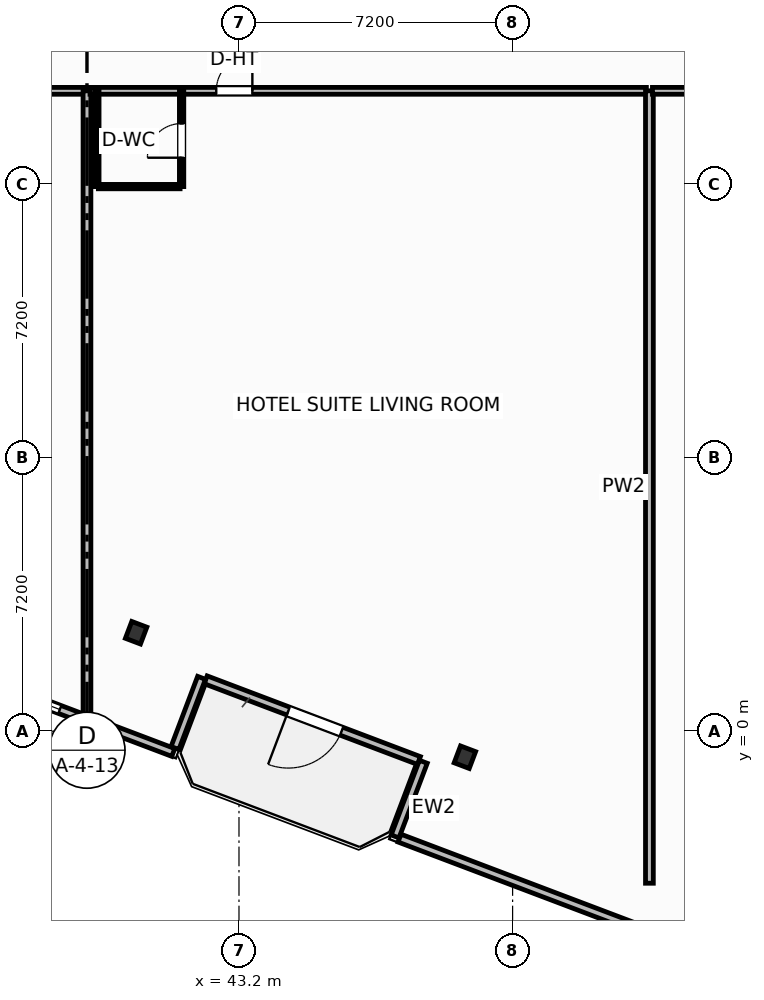
"""IFC4 building model, lengths in metres.
Left out: names, types, materials, properties, quantities, classifications, styles, units other than length and angle.
Written with IfcOpenShell. Run it as: python <this file> out.ifc"""

import sys

from ifc_helpers import new_model, si_unit, direction, frame, frame_2d, origin, origin_2d, place, context, subcontext, project, spatial, rectangle, i_section, extrude, element, fill, save


model = new_model("IFC4")
c1 = context("Model", 3, precision=1e-05, world=origin(), true_north=direction((0.0, 1.0)))
c2 = subcontext(c1, "Body", "Model", "MODEL_VIEW")
j1 = project(units=[si_unit("LENGTHUNIT", "METRE"), si_unit("PLANEANGLEUNIT", "RADIAN")], contexts=[c1])
p1 = place(None, origin())
s1 = spatial("IfcSite", under=j1, at=p1, CompositionType="ELEMENT")
p2 = place(p1, origin())
s2 = spatial("IfcBuilding", under=s1, at=p2, CompositionType="ELEMENT")
p3 = place(p2, frame((0.0, 0.0, 102.1)))
s3 = spatial("IfcBuildingStorey", under=s2, at=p3, CompositionType="ELEMENT", Elevation=102.1)
for number, where, z_axis, x_axis in (
    (1, (40.493, 2.591, 0.0), (0.0, 0.0, 1.0), (0.935, -0.354, 0.0)),
    (2, (49.144, -0.684, 0.0), (0.0, 0.0, 1.0), (0.935, -0.354, 0.0)),
):
    element("IfcColumn", number, at=place(p3, frame(where, z_axis=z_axis, x_axis=x_axis)), inside=s3, PredefinedType="COLUMN", context=c2, shape_type="SweptSolid", body=[
        extrude(i_section(OverallWidth=0.424, OverallDepth=0.474, WebThickness=0.048, FlangeThickness=0.077, FilletRadius=0.025, at=origin_2d()), origin(), (0.0, 0.0, 1.0), 3.7),
    ])
p4 = place(p3, frame((47.935, -0.771, 0.0), z_axis=(0.0, 0.0, 1.0), x_axis=(-0.935227640088, 0.354046976001, 0.0)))
e3 = element("IfcWall", 3, at=p4, inside=s3, PredefinedType="SOLIDWALL", context=c2, shape_type="SweptSolid", body=[
    extrude(rectangle(XDim=6.0, YDim=0.22, at=frame_2d((3.0, 0.0))), origin(), (0.0, 0.0, 1.0), 2.73),
])
p5 = place(p4, frame((2.176, 0.0, 0.0)))
e4 = element("IfcOpeningElement", 4, at=p5, cuts=e3, PredefinedType="OPENING", context=c2, shape_type="SweptSolid", body=[
    extrude(rectangle(XDim=1.5, YDim=2.25, at=frame_2d((0.75, 1.125))), frame((0.0, 0.12, 0.0), z_axis=(0.0, -1.0, 0.0), x_axis=(1.0, 0.0, 0.0)), (0.0, 0.0, 1.0), 0.24),
])
p6 = place(p3, frame((33.957, 2.286, 0.0), z_axis=(0.0, 0.0, 1.0), x_axis=(0.935220736163, -0.354065212427, 0.0)))
e5 = element("IfcWall", 5, at=p6, inside=s3, PredefinedType="SOLIDWALL", context=c2, shape_type="SweptSolid", body=[
    extrude(rectangle(XDim=8.035, YDim=0.22, at=frame_2d((4.018, 0.0))), origin(), (0.0, 0.0, 1.0), 2.73),
])
p7 = place(p6, frame((3.192, 0.0, 0.8)))
e6 = element("IfcOpeningElement", 6, at=p7, cuts=e5, PredefinedType="OPENING", context=c2, shape_type="SweptSolid", body=[
    extrude(rectangle(XDim=1.65, YDim=1.65, at=frame_2d((0.825, 0.825))), frame((0.0, 0.12, 0.0), z_axis=(0.0, -1.0, 0.0), x_axis=(1.0, 0.0, 0.0)), (0.0, 0.0, 1.0), 0.24),
])
p8 = place(p3, frame((41.516, -0.442, 0.0), z_axis=(0.0, 0.0, 1.0), x_axis=(0.354061611705, 0.935222099352, 0.0)))
e7 = element("IfcWall", 7, at=p8, inside=s3, PredefinedType="SOLIDWALL", context=c2, shape_type="SweptSolid", body=[
    extrude(rectangle(XDim=1.975, YDim=0.22, at=frame_2d((0.987, 0.0))), origin(), (0.0, 0.0, 1.0), 2.73),
])
p9 = place(p3, frame((48.051, -0.805, 0.0), z_axis=(0.0, 0.0, 1.0), x_axis=(-0.353988291547, -0.935249854022, 0.0)))
e8 = element("IfcWall", 8, at=p9, inside=s3, PredefinedType="SOLIDWALL", context=c2, shape_type="SweptSolid", body=[
    extrude(rectangle(XDim=2.1, YDim=0.22, at=frame_2d((1.05, 0.0))), origin(), (0.0, 0.0, 1.0), 2.73),
])
p10 = place(p3, frame((47.424, -2.813, 0.0), z_axis=(0.0, 0.0, 1.0), x_axis=(0.935225962032, -0.354051408614, 0.0)))
e9 = element("IfcWall", 9, at=p10, inside=s3, PredefinedType="SOLIDWALL", context=c2, shape_type="SweptSolid", body=[
    extrude(rectangle(XDim=14.347, YDim=0.22, at=frame_2d((7.173, 0.0))), origin(), (0.0, 0.0, 1.0), 2.73),
])
p11 = place(p10, frame((6.348, 0.0, 0.8)))
e10 = element("IfcOpeningElement", 10, at=p11, cuts=e9, PredefinedType="OPENING", context=c2, shape_type="SweptSolid", body=[
    extrude(rectangle(XDim=1.65, YDim=1.65, at=frame_2d((0.825, 0.825))), frame((0.0, 0.12, 0.0), z_axis=(0.0, -1.0, 0.0), x_axis=(1.0, 0.0, 0.0)), (0.0, 0.0, 1.0), 0.24),
])
p12 = place(p3, frame((24.08, 16.85, 0.0), z_axis=(0.0, 0.0, 1.0), x_axis=(1.0, 0.0, 0.0)))
e11 = element("IfcWall", 11, at=p12, inside=s3, PredefinedType="PARTITIONING", context=c2, shape_type="SweptSolid", body=[
    extrude(rectangle(XDim=15.04, YDim=0.18, at=frame_2d((7.52, 0.0))), origin(), (0.0, 0.0, 1.0), 3.45),
])
p13 = place(p12, frame((7.045, 0.0, 0.0)))
e12 = element("IfcOpeningElement", 12, at=p13, cuts=e11, PredefinedType="OPENING", context=c2, shape_type="SweptSolid", body=[
    extrude(rectangle(XDim=0.95, YDim=2.05, at=frame_2d((0.475, 1.025))), frame((0.0, 0.1, 0.0), z_axis=(0.0, -1.0, 0.0), x_axis=(1.0, 0.0, 0.0)), (0.0, 0.0, 1.0), 0.2),
])
p14 = place(p3, frame((39.2, 0.322, 0.0), z_axis=(0.0, 0.0, 1.0), x_axis=(0.0, 1.0, 0.0)))
e13 = element("IfcWall", 13, at=p14, inside=s3, PredefinedType="PARTITIONING", context=c2, shape_type="SweptSolid", body=[
    extrude(rectangle(XDim=16.528, YDim=0.205, at=frame_2d((8.264, 0.0))), origin(), (0.0, 0.0, 1.0), 3.45),
])
p15 = place(p3, frame((39.28, 16.85, 0.0), z_axis=(0.0, 0.0, 1.0), x_axis=(1.0, 0.0, 0.0)))
e14 = element("IfcWall", 14, at=p15, inside=s3, PredefinedType="PARTITIONING", context=c2, shape_type="SweptSolid", body=[
    extrude(rectangle(XDim=14.64, YDim=0.18, at=frame_2d((7.32, 0.0))), origin(), (0.0, 0.0, 1.0), 3.45),
])
p16 = place(p15, frame((3.322, 0.0, 0.0)))
e15 = element("IfcOpeningElement", 15, at=p16, cuts=e14, PredefinedType="OPENING", context=c2, shape_type="SweptSolid", body=[
    extrude(rectangle(XDim=0.95, YDim=2.15, at=frame_2d((0.475, 1.075))), frame((0.0, 0.1, 0.0), z_axis=(0.0, -1.0, 0.0), x_axis=(1.0, 0.0, 0.0)), (0.0, 0.0, 1.0), 0.2),
])
p17 = place(p3, frame((39.5, 14.33, 0.0), z_axis=(0.0, 0.0, 1.0), x_axis=(1.0, 0.0, 0.0)))
e16 = element("IfcWall", 16, at=p17, inside=s3, PredefinedType="PARTITIONING", context=c2, shape_type="SweptSolid", body=[
    extrude(rectangle(XDim=2.15, YDim=0.115, at=frame_2d((1.075, 0.0))), origin(), (0.0, 0.0, 1.0), 3.45),
])
p18 = place(p3, frame((41.69, 14.33, 0.0), z_axis=(0.0, 0.0, 1.0), x_axis=(0.0, 1.0, 0.0)))
e17 = element("IfcWall", 17, at=p18, inside=s3, PredefinedType="PARTITIONING", context=c2, shape_type="SweptSolid", body=[
    extrude(rectangle(XDim=2.52, YDim=0.115, at=frame_2d((1.26, 0.0))), origin(), (0.0, 0.0, 1.0), 3.45),
])
p19 = place(p18, frame((0.76, 0.0, 0.0)))
e18 = element("IfcOpeningElement", 18, at=p19, cuts=e17, PredefinedType="OPENING", context=c2, shape_type="SweptSolid", body=[
    extrude(rectangle(XDim=0.9, YDim=2.05, at=frame_2d((0.45, 1.025))), frame((0.0, 0.067, 0.0), z_axis=(0.0, -1.0, 0.0), x_axis=(1.0, 0.0, 0.0)), (0.0, 0.0, 1.0), 0.135),
])
p20 = place(p3, frame((39.46, 14.33, 0.0), z_axis=(0.0, 0.0, 1.0), x_axis=(0.0, 1.0, 0.0)))
e19 = element("IfcWall", 19, at=p20, inside=s3, PredefinedType="PARTITIONING", context=c2, shape_type="SweptSolid", body=[
    extrude(rectangle(XDim=2.52, YDim=0.115, at=frame_2d((1.26, 0.0))), origin(), (0.0, 0.0, 1.0), 3.45),
])
p21 = place(p3, frame((54.0, -4.0, 0.0), z_axis=(0.0, 0.0, 1.0), x_axis=(0.0, 1.0, 0.0)))
e20 = element("IfcWall", 20, at=p21, inside=s3, PredefinedType="PARTITIONING", context=c2, shape_type="SweptSolid", body=[
    extrude(rectangle(XDim=20.85, YDim=0.205, at=frame_2d((10.425, 0.0))), origin(), (0.0, 0.0, 1.0), 3.45),
])
p22 = place(p3, frame((54.08, 16.85, 0.0), z_axis=(0.0, 0.0, 1.0), x_axis=(1.0, 0.0, 0.0)))
e21 = element("IfcWall", 21, at=p22, inside=s3, PredefinedType="PARTITIONING", context=c2, shape_type="SweptSolid", body=[
    extrude(rectangle(XDim=21.722, YDim=0.18, at=frame_2d((10.861, 0.0))), origin(), (0.0, 0.0, 1.0), 2.58),
])
p23 = place(p22, frame((0.934, 0.0, 0.0)))
e22 = element("IfcOpeningElement", 22, at=p23, cuts=e21, PredefinedType="OPENING", context=c2, shape_type="SweptSolid", body=[
    extrude(rectangle(XDim=0.95, YDim=2.15, at=frame_2d((0.475, 1.075))), frame((0.0, 0.1, 0.0), z_axis=(0.0, -1.0, 0.0), x_axis=(1.0, 0.0, 0.0)), (0.0, 0.0, 1.0), 0.2),
])
p24 = place(p5, origin())
e23 = element("IfcDoor", 23, at=p24, inside=s3, OperationType="SINGLE_SWING_RIGHT", PredefinedType="DOOR", context=c2, shape_type="SweptSolid", body=[
    extrude(rectangle(XDim=1.5, YDim=2.25, at=frame_2d((0.75, 1.125))), frame((0.0, 0.025, 0.0), z_axis=(0.0, -1.0, 0.0), x_axis=(1.0, 0.0, 0.0)), (0.0, 0.0, 1.0), 0.05),
])
fill(e4, e23)
p25 = place(p7, origin())
e24 = element("IfcWindow", 24, at=p25, inside=s3, PartitioningType="SINGLE_PANEL", PredefinedType="WINDOW", context=c2, shape_type="SweptSolid", body=[
    extrude(rectangle(XDim=1.65, YDim=1.65, at=frame_2d((0.825, 0.825))), frame((0.0, 0.03, 0.0), z_axis=(0.0, -1.0, 0.0), x_axis=(1.0, 0.0, 0.0)), (0.0, 0.0, 1.0), 0.06),
])
fill(e6, e24)
p26 = place(p16, origin())
e25 = element("IfcDoor", 25, at=p26, inside=s3, OperationType="SINGLE_SWING_RIGHT", PredefinedType="DOOR", context=c2, shape_type="SweptSolid", body=[
    extrude(rectangle(XDim=0.95, YDim=2.15, at=frame_2d((0.475, 1.075))), frame((0.0, 0.025, 0.0), z_axis=(0.0, -1.0, 0.0), x_axis=(1.0, 0.0, 0.0)), (0.0, 0.0, 1.0), 0.05),
])
fill(e15, e25)
p27 = place(p19, origin())
e26 = element("IfcDoor", 26, at=p27, inside=s3, OperationType="SINGLE_SWING_LEFT", PredefinedType="DOOR", context=c2, shape_type="SweptSolid", body=[
    extrude(rectangle(XDim=0.9, YDim=2.05, at=frame_2d((0.45, 1.025))), frame((0.0, 0.025, 0.0), z_axis=(0.0, -1.0, 0.0), x_axis=(1.0, 0.0, 0.0)), (0.0, 0.0, 1.0), 0.05),
])
fill(e18, e26)
save(model, sys.argv[1])
